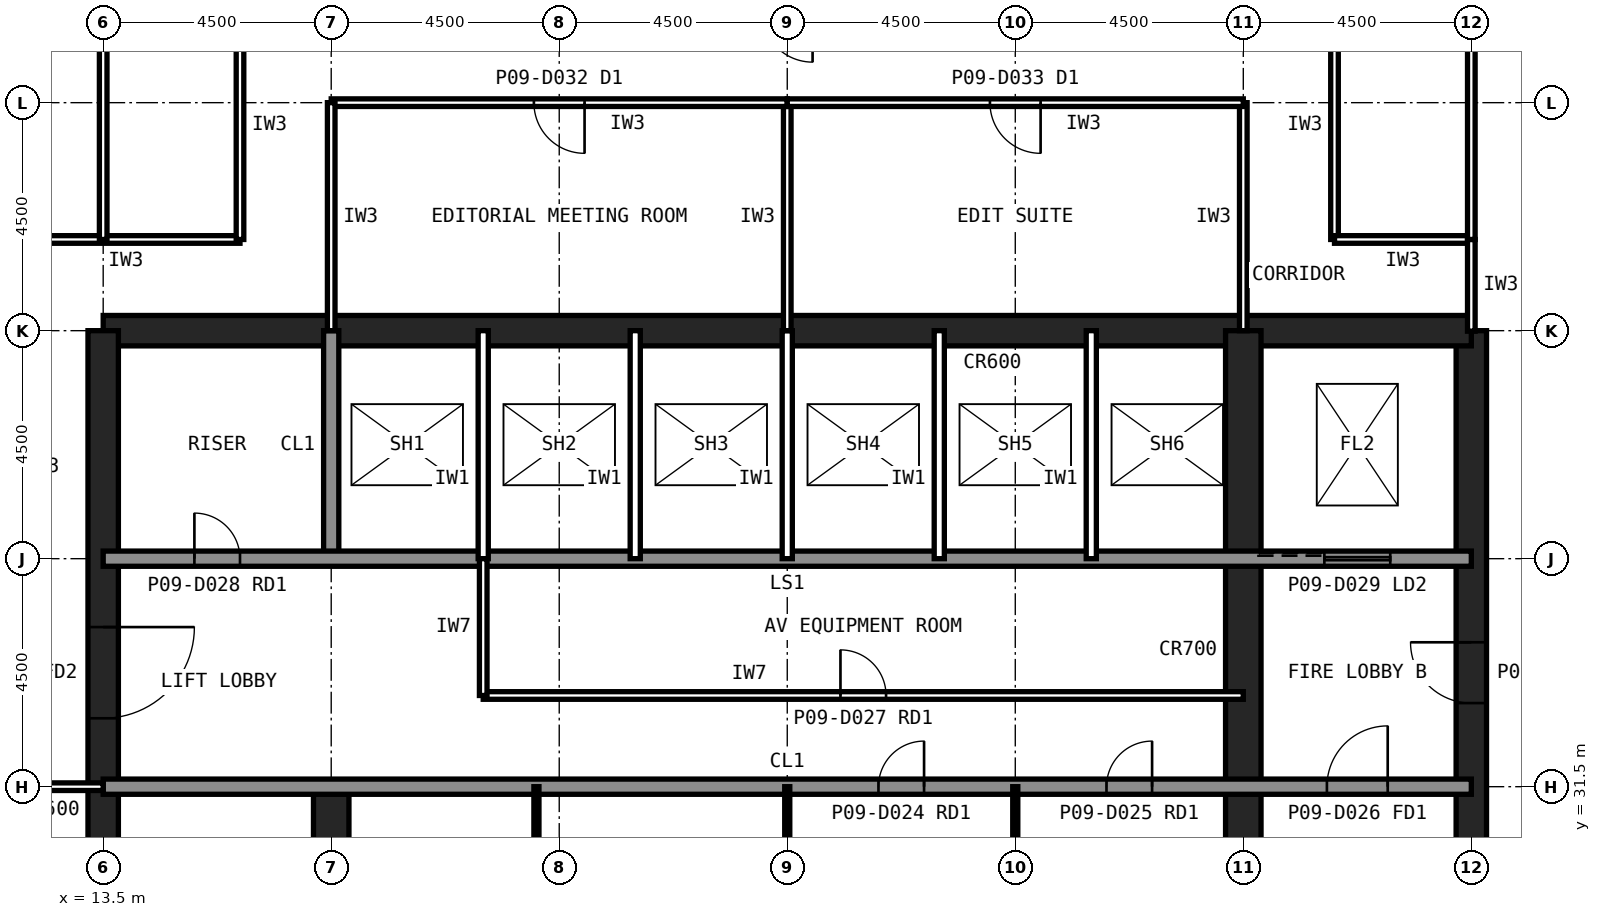
"""IFC4 building model, lengths in metres.
Left out: names, types, materials, properties, quantities, classifications, styles, units other than length and angle.
Written with IfcOpenShell. Run it as: python <this file> out.ifc"""

import sys

from ifc_helpers import new_model, si_unit, direction, frame, frame_2d, origin, place, context, subcontext, project, spatial, rectangle, extrude, element, fill, save


model = new_model("IFC4")
c1 = context("Model", 3, precision=1e-05, world=origin(), true_north=direction((0.0, 1.0)))
c2 = subcontext(c1, "Body", "Model", "MODEL_VIEW")
j1 = project(units=[si_unit("LENGTHUNIT", "METRE"), si_unit("PLANEANGLEUNIT", "RADIAN")], contexts=[c1])
p1 = place(None, origin())
s1 = spatial("IfcSite", under=j1, at=p1, CompositionType="ELEMENT")
p2 = place(p1, origin())
s2 = spatial("IfcBuilding", under=s1, at=p2, CompositionType="ELEMENT")
p3 = place(p2, frame((0.0, 0.0, 41.6)))
s3 = spatial("IfcBuildingStorey", under=s2, at=p3, CompositionType="ELEMENT", Elevation=41.6)
p4 = place(p3, frame((40.5, 13.5, 0.0), z_axis=(0.0, 0.0, 1.0), x_axis=(0.0, 1.0, 0.0)))
e1 = element("IfcWall", 1, at=p4, inside=s3, PredefinedType="SHEAR", context=c2, shape_type="SweptSolid", body=[
    extrude(rectangle(XDim=27.0, YDim=0.6, at=frame_2d((13.5, 0.0))), origin(), (0.0, 0.0, 1.0), 4.2),
])
p5 = place(p4, frame((5.85, 0.0, 0.0)))
e2 = element("IfcOpeningElement", 2, at=p5, cuts=e1, PredefinedType="OPENING", context=c2, shape_type="SweptSolid", body=[
    extrude(rectangle(XDim=1.8, YDim=2.1, at=frame_2d((0.9, 1.05))), frame((0.0, 0.31, 0.0), z_axis=(0.0, -1.0, 0.0), x_axis=(1.0, 0.0, 0.0)), (0.0, 0.0, 1.0), 0.62),
])
p6 = place(p4, frame((19.65, 0.0, 0.0)))
e3 = element("IfcOpeningElement", 3, at=p6, cuts=e1, PredefinedType="OPENING", context=c2, shape_type="SweptSolid", body=[
    extrude(rectangle(XDim=1.2, YDim=2.1, at=frame_2d((0.6, 1.05))), frame((0.0, 0.31, 0.0), z_axis=(0.0, -1.0, 0.0), x_axis=(1.0, 0.0, 0.0)), (0.0, 0.0, 1.0), 0.62),
])
p7 = place(p3, frame((40.5, 40.5, 0.0), z_axis=(0.0, 0.0, 1.0), x_axis=(-1.0, 0.0, 0.0)))
e4 = element("IfcWall", 4, at=p7, inside=s3, PredefinedType="SHEAR", context=c2, shape_type="SweptSolid", body=[
    extrude(rectangle(XDim=27.0, YDim=0.6, at=frame_2d((13.5, 0.0))), origin(), (0.0, 0.0, 1.0), 4.2),
])
p8 = place(p3, frame((13.5, 40.5, 0.0), z_axis=(0.0, 0.0, 1.0), x_axis=(0.0, -1.0, 0.0)))
e5 = element("IfcWall", 5, at=p8, inside=s3, PredefinedType="SHEAR", context=c2, shape_type="SweptSolid", body=[
    extrude(rectangle(XDim=27.0, YDim=0.6, at=frame_2d((13.5, 0.0))), origin(), (0.0, 0.0, 1.0), 4.2),
])
p9 = place(p8, frame((19.65, 0.0, 0.0)))
e6 = element("IfcOpeningElement", 6, at=p9, cuts=e5, PredefinedType="OPENING", context=c2, shape_type="SweptSolid", body=[
    extrude(rectangle(XDim=1.2, YDim=2.1, at=frame_2d((0.6, 1.05))), frame((0.0, 0.31, 0.0), z_axis=(0.0, -1.0, 0.0), x_axis=(1.0, 0.0, 0.0)), (0.0, 0.0, 1.0), 0.62),
])
p10 = place(p8, frame((5.85, 0.0, 0.0)))
e7 = element("IfcOpeningElement", 7, at=p10, cuts=e5, PredefinedType="OPENING", context=c2, shape_type="SweptSolid", body=[
    extrude(rectangle(XDim=1.8, YDim=2.1, at=frame_2d((0.9, 1.05))), frame((0.0, 0.31, 0.0), z_axis=(0.0, -1.0, 0.0), x_axis=(1.0, 0.0, 0.0)), (0.0, 0.0, 1.0), 0.62),
])
p11 = place(p3, frame((18.0, 13.5, 0.0), z_axis=(0.0, 0.0, 1.0), x_axis=(0.0, 1.0, 0.0)))
e8 = element("IfcWall", 8, at=p11, inside=s3, PredefinedType="SHEAR", context=c2, shape_type="SweptSolid", body=[
    extrude(rectangle(XDim=18.0, YDim=0.7, at=frame_2d((9.0, 0.0))), origin(), (0.0, 0.0, 1.0), 4.2),
])
p12 = place(p3, frame((18.0, 36.0, 0.0), z_axis=(0.0, 0.0, 1.0), x_axis=(0.0, 1.0, 0.0)))
e9 = element("IfcWall", 9, at=p12, inside=s3, PredefinedType="SOLIDWALL", context=c2, shape_type="SweptSolid", body=[
    extrude(rectangle(XDim=4.5, YDim=0.3, at=frame_2d((2.25, 0.0))), origin(), (0.0, 0.0, 1.0), 4.04),
])
p13 = place(p3, frame((36.0, 22.5, 0.0), z_axis=(0.0, 0.0, 1.0), x_axis=(0.0, 1.0, 0.0)))
e10 = element("IfcWall", 10, at=p13, inside=s3, PredefinedType="SHEAR", context=c2, shape_type="SweptSolid", body=[
    extrude(rectangle(XDim=18.0, YDim=0.7, at=frame_2d((9.0, 0.0))), origin(), (0.0, 0.0, 1.0), 4.2),
])
p14 = place(p3, frame((13.5, 36.0, 0.0), z_axis=(0.0, 0.0, 1.0), x_axis=(1.0, 0.0, 0.0)))
e11 = element("IfcWall", 11, at=p14, inside=s3, PredefinedType="SOLIDWALL", context=c2, shape_type="SweptSolid", body=[
    extrude(rectangle(XDim=27.0, YDim=0.3, at=frame_2d((13.5, 0.0))), origin(), (0.0, 0.0, 1.0), 4.04),
])
p15 = place(p14, frame((1.8, 0.0, 0.0)))
e12 = element("IfcOpeningElement", 12, at=p15, cuts=e11, PredefinedType="OPENING", context=c2, shape_type="SweptSolid", body=[
    extrude(rectangle(XDim=0.9, YDim=2.1, at=frame_2d((0.45, 1.05))), frame((0.0, 0.16, 0.0), z_axis=(0.0, -1.0, 0.0), x_axis=(1.0, 0.0, 0.0)), (0.0, 0.0, 1.0), 0.32),
])
p16 = place(p14, frame((24.1, 0.0, 0.0)))
e13 = element("IfcOpeningElement", 13, at=p16, cuts=e11, PredefinedType="OPENING", context=c2, shape_type="SweptSolid", body=[
    extrude(rectangle(XDim=1.3, YDim=2.2, at=frame_2d((0.65, 1.1))), frame((0.0, 0.16, 0.0), z_axis=(0.0, -1.0, 0.0), x_axis=(1.0, 0.0, 0.0)), (0.0, 0.0, 1.0), 0.32),
])
p17 = place(p3, frame((13.5, 31.5, 0.0), z_axis=(0.0, 0.0, 1.0), x_axis=(1.0, 0.0, 0.0)))
e14 = element("IfcWall", 14, at=p17, inside=s3, PredefinedType="SOLIDWALL", context=c2, shape_type="SweptSolid", body=[
    extrude(rectangle(XDim=27.0, YDim=0.3, at=frame_2d((13.5, 0.0))), origin(), (0.0, 0.0, 1.0), 4.04),
])
p18 = place(p17, frame((24.15, 0.0, 0.0)))
e15 = element("IfcOpeningElement", 15, at=p18, cuts=e14, PredefinedType="OPENING", context=c2, shape_type="SweptSolid", body=[
    extrude(rectangle(XDim=1.2, YDim=2.1, at=frame_2d((0.6, 1.05))), frame((0.0, 0.16, 0.0), z_axis=(0.0, -1.0, 0.0), x_axis=(1.0, 0.0, 0.0)), (0.0, 0.0, 1.0), 0.32),
])
p19 = place(p17, frame((15.3, 0.0, 0.0)))
e16 = element("IfcOpeningElement", 16, at=p19, cuts=e14, PredefinedType="OPENING", context=c2, shape_type="SweptSolid", body=[
    extrude(rectangle(XDim=0.9, YDim=2.1, at=frame_2d((0.45, 1.05))), frame((0.0, 0.16, 0.0), z_axis=(0.0, -1.0, 0.0), x_axis=(1.0, 0.0, 0.0)), (0.0, 0.0, 1.0), 0.32),
])
p20 = place(p17, frame((19.8, 0.0, 0.0)))
e17 = element("IfcOpeningElement", 17, at=p20, cuts=e14, PredefinedType="OPENING", context=c2, shape_type="SweptSolid", body=[
    extrude(rectangle(XDim=0.9, YDim=2.1, at=frame_2d((0.45, 1.05))), frame((0.0, 0.16, 0.0), z_axis=(0.0, -1.0, 0.0), x_axis=(1.0, 0.0, 0.0)), (0.0, 0.0, 1.0), 0.32),
])
for number, where, z_axis, x_axis in (
    (18, (21.0, 36.0, 0.0), (0.0, 0.0, 1.0), (0.0, 1.0, 0.0)),
    (19, (24.0, 36.0, 0.0), (0.0, 0.0, 1.0), (0.0, 1.0, 0.0)),
    (20, (27.0, 36.0, 0.0), (0.0, 0.0, 1.0), (0.0, 1.0, 0.0)),
    (21, (30.0, 36.0, 0.0), (0.0, 0.0, 1.0), (0.0, 1.0, 0.0)),
    (22, (33.0, 36.0, 0.0), (0.0, 0.0, 1.0), (0.0, 1.0, 0.0)),
):
    element("IfcWall", number, at=place(p3, frame(where, z_axis=z_axis, x_axis=x_axis)), inside=s3, PredefinedType="PARTITIONING", context=c2, shape_type="SweptSolid", body=[
        extrude(rectangle(XDim=4.5, YDim=0.2, at=frame_2d((2.25, 0.0))), origin(), (0.0, 0.0, 1.0), 4.04),
    ])
for number, where, z_axis, x_axis in (
    (23, (22.05, 22.5, 0.0), (0.0, 0.0, 1.0), (0.0, 1.0, 0.0)),
    (24, (27.0, 22.5, 0.0), (0.0, 0.0, 1.0), (0.0, 1.0, 0.0)),
    (25, (31.5, 22.5, 0.0), (0.0, 0.0, 1.0), (0.0, 1.0, 0.0)),
):
    element("IfcWall", number, at=place(p3, frame(where, z_axis=z_axis, x_axis=x_axis)), inside=s3, PredefinedType="PLUMBINGWALL", context=c2, shape_type="SweptSolid", body=[
        extrude(rectangle(XDim=9.0, YDim=0.1, at=frame_2d((4.5, 0.0))), origin(), (0.0, 0.0, 1.0), 4.04),
    ])
p21 = place(p3, frame((21.0, 33.3, 0.0), z_axis=(0.0, 0.0, 1.0), x_axis=(1.0, 0.0, 0.0)))
e26 = element("IfcWall", 26, at=p21, inside=s3, PredefinedType="PARTITIONING", context=c2, shape_type="SweptSolid", body=[
    extrude(rectangle(XDim=15.0, YDim=0.15, at=frame_2d((7.5, 0.0))), origin(), (0.0, 0.0, 1.0), 4.04),
])
p22 = place(p21, frame((7.05, 0.0, 0.0)))
e27 = element("IfcOpeningElement", 27, at=p22, cuts=e26, PredefinedType="OPENING", context=c2, shape_type="SweptSolid", body=[
    extrude(rectangle(XDim=0.9, YDim=2.1, at=frame_2d((0.45, 1.05))), frame((0.0, 0.085, 0.0), z_axis=(0.0, -1.0, 0.0), x_axis=(1.0, 0.0, 0.0)), (0.0, 0.0, 1.0), 0.17),
])
p23 = place(p3, frame((21.0, 33.3, 0.0), z_axis=(0.0, 0.0, 1.0), x_axis=(0.0, 1.0, 0.0)))
e28 = element("IfcWall", 28, at=p23, inside=s3, PredefinedType="PARTITIONING", context=c2, shape_type="SweptSolid", body=[
    extrude(rectangle(XDim=2.7, YDim=0.15, at=frame_2d((1.35, 0.0))), origin(), (0.0, 0.0, 1.0), 4.04),
])
for number, where, z_axis, x_axis in (
    (29, (16.2, 42.3, 0.0), (0.0, 0.0, 1.0), (-1.0, 0.0, 0.0)),
    (30, (16.2, 46.8, 0.0), (0.0, 0.0, 1.0), (0.0, -1.0, 0.0)),
    (31, (37.8, 42.3, 0.0), (0.0, 0.0, 1.0), (0.0, 1.0, 0.0)),
):
    element("IfcWall", number, at=place(p3, frame(where, z_axis=z_axis, x_axis=x_axis)), inside=s3, PredefinedType="PARTITIONING", context=c2, shape_type="SweptSolid", body=[
        extrude(rectangle(XDim=4.5, YDim=0.15, at=frame_2d((2.25, 0.0))), origin(), (0.0, 0.0, 1.0), 4.04),
    ])
p24 = place(p3, frame((40.5, 42.3, 0.0), z_axis=(0.0, 0.0, 1.0), x_axis=(-1.0, 0.0, 0.0)))
e32 = element("IfcWall", 32, at=p24, inside=s3, PredefinedType="PARTITIONING", context=c2, shape_type="SweptSolid", body=[
    extrude(rectangle(XDim=2.7, YDim=0.15, at=frame_2d((1.35, 0.0))), origin(), (0.0, 0.0, 1.0), 4.04),
])
p25 = place(p3, frame((40.5, 40.49, 0.0), z_axis=(0.0, 0.0, 1.0), x_axis=(0.0, 1.0, 0.0)))
e33 = element("IfcWall", 33, at=p25, inside=s3, PredefinedType="PARTITIONING", context=c2, shape_type="SweptSolid", body=[
    extrude(rectangle(XDim=1.81, YDim=0.15, at=frame_2d((0.905, 0.0))), origin(), (0.0, 0.0, 1.0), 3.189),
])
p26 = place(p3, frame((27.0, 40.5, 0.0), z_axis=(0.0, 0.0, 1.0), x_axis=(0.0, 1.0, 0.0)))
e34 = element("IfcWall", 34, at=p26, inside=s3, PredefinedType="PARTITIONING", context=c2, shape_type="SweptSolid", body=[
    extrude(rectangle(XDim=4.5, YDim=0.15, at=frame_2d((2.25, 0.0))), origin(), (0.0, 0.0, 1.0), 3.189),
])
p27 = place(p3, frame((27.0, 45.0, 0.0), z_axis=(0.0, 0.0, 1.0), x_axis=(-1.0, 0.0, 0.0)))
e35 = element("IfcWall", 35, at=p27, inside=s3, PredefinedType="PARTITIONING", context=c2, shape_type="SweptSolid", body=[
    extrude(rectangle(XDim=9.0, YDim=0.15, at=frame_2d((4.5, 0.0))), origin(), (0.0, 0.0, 1.0), 4.04),
])
p28 = place(p27, frame((4.0, 0.0, 0.0)))
e36 = element("IfcOpeningElement", 36, at=p28, cuts=e35, PredefinedType="OPENING", context=c2, shape_type="SweptSolid", body=[
    extrude(rectangle(XDim=1.0, YDim=2.1, at=frame_2d((0.5, 1.05))), frame((0.0, 0.085, 0.0), z_axis=(0.0, -1.0, 0.0), x_axis=(1.0, 0.0, 0.0)), (0.0, 0.0, 1.0), 0.17),
])
for number, where, z_axis, x_axis in (
    (37, (18.0, 45.0, 0.0), (0.0, 0.0, 1.0), (0.0, -1.0, 0.0)),
    (38, (36.0, 40.5, 0.0), (0.0, 0.0, 1.0), (0.0, 1.0, 0.0)),
):
    element("IfcWall", number, at=place(p3, frame(where, z_axis=z_axis, x_axis=x_axis)), inside=s3, PredefinedType="PARTITIONING", context=c2, shape_type="SweptSolid", body=[
        extrude(rectangle(XDim=4.5, YDim=0.15, at=frame_2d((2.25, 0.0))), origin(), (0.0, 0.0, 1.0), 3.189),
    ])
p29 = place(p3, frame((36.0, 45.0, 0.0), z_axis=(0.0, 0.0, 1.0), x_axis=(-1.0, 0.0, 0.0)))
e39 = element("IfcWall", 39, at=p29, inside=s3, PredefinedType="PARTITIONING", context=c2, shape_type="SweptSolid", body=[
    extrude(rectangle(XDim=9.0, YDim=0.15, at=frame_2d((4.5, 0.0))), origin(), (0.0, 0.0, 1.0), 4.04),
])
p30 = place(p29, frame((4.0, 0.0, 0.0)))
e40 = element("IfcOpeningElement", 40, at=p30, cuts=e39, PredefinedType="OPENING", context=c2, shape_type="SweptSolid", body=[
    extrude(rectangle(XDim=1.0, YDim=2.1, at=frame_2d((0.5, 1.05))), frame((0.0, 0.085, 0.0), z_axis=(0.0, -1.0, 0.0), x_axis=(1.0, 0.0, 0.0)), (0.0, 0.0, 1.0), 0.17),
])
p31 = place(p3, frame((13.5, 31.5, 0.0), z_axis=(0.0, 0.0, 1.0), x_axis=(-1.0, 0.0, 0.0)))
e41 = element("IfcWall", 41, at=p31, inside=s3, PredefinedType="PARTITIONING", context=c2, shape_type="SweptSolid", body=[
    extrude(rectangle(XDim=4.5, YDim=0.15, at=frame_2d((2.25, 0.0))), origin(), (0.0, 0.0, 1.0), 3.189),
])
p32 = place(p3, frame((40.5, 53.53, 0.0), z_axis=(0.0, 0.0, 1.0), x_axis=(0.0, -1.0, 0.0)))
e42 = element("IfcWall", 42, at=p32, inside=s3, PredefinedType="PARTITIONING", context=c2, shape_type="SweptSolid", body=[
    extrude(rectangle(XDim=11.23, YDim=0.15, at=frame_2d((5.615, 0.0))), origin(), (0.0, 0.0, 1.0), 3.189),
])
p33 = place(p32, frame((5.115, 0.0, 0.0)))
e43 = element("IfcOpeningElement", 43, at=p33, cuts=e42, PredefinedType="OPENING", context=c2, shape_type="SweptSolid", body=[
    extrude(rectangle(XDim=1.0, YDim=2.1, at=frame_2d((0.5, 1.05))), frame((0.0, 0.085, 0.0), z_axis=(0.0, -1.0, 0.0), x_axis=(1.0, 0.0, 0.0)), (0.0, 0.0, 1.0), 0.17),
])
p34 = place(p3, frame((13.5, 42.3, 0.0), z_axis=(0.0, 0.0, 1.0), x_axis=(0.0, 1.0, 0.0)))
e44 = element("IfcWall", 44, at=p34, inside=s3, PredefinedType="PARTITIONING", context=c2, shape_type="SweptSolid", body=[
    extrude(rectangle(XDim=11.23, YDim=0.15, at=frame_2d((5.615, 0.0))), origin(), (0.0, 0.0, 1.0), 3.189),
])
p35 = place(p34, frame((5.115, 0.0, 0.0)))
e45 = element("IfcOpeningElement", 45, at=p35, cuts=e44, PredefinedType="OPENING", context=c2, shape_type="SweptSolid", body=[
    extrude(rectangle(XDim=1.0, YDim=2.1, at=frame_2d((0.5, 1.05))), frame((0.0, 0.085, 0.0), z_axis=(0.0, -1.0, 0.0), x_axis=(1.0, 0.0, 0.0)), (0.0, 0.0, 1.0), 0.17),
])
p36 = place(p10, origin())
e46 = element("IfcDoor", 46, at=p36, inside=s3, OperationType="SINGLE_SWING_LEFT", PredefinedType="DOOR", context=c2, shape_type="SweptSolid", body=[
    extrude(rectangle(XDim=1.8, YDim=2.1, at=frame_2d((0.9, 1.05))), frame((0.0, 0.025, 0.0), z_axis=(0.0, -1.0, 0.0), x_axis=(1.0, 0.0, 0.0)), (0.0, 0.0, 1.0), 0.05),
])
fill(e7, e46)
p37 = place(p6, origin())
e47 = element("IfcDoor", 47, at=p37, inside=s3, OperationType="SINGLE_SWING_RIGHT", PredefinedType="DOOR", context=c2, shape_type="SweptSolid", body=[
    extrude(rectangle(XDim=1.2, YDim=2.1, at=frame_2d((0.6, 1.05))), frame((0.0, 0.025, 0.0), z_axis=(0.0, -1.0, 0.0), x_axis=(1.0, 0.0, 0.0)), (0.0, 0.0, 1.0), 0.05),
])
fill(e3, e47)
p38 = place(p18, origin())
e48 = element("IfcDoor", 48, at=p38, inside=s3, OperationType="SINGLE_SWING_RIGHT", PredefinedType="DOOR", context=c2, shape_type="SweptSolid", body=[
    extrude(rectangle(XDim=1.2, YDim=2.1, at=frame_2d((0.6, 1.05))), frame((0.0, 0.025, 0.0), z_axis=(0.0, -1.0, 0.0), x_axis=(1.0, 0.0, 0.0)), (0.0, 0.0, 1.0), 0.05),
])
fill(e15, e48)
p39 = place(p19, origin())
e49 = element("IfcDoor", 49, at=p39, inside=s3, OperationType="SINGLE_SWING_RIGHT", PredefinedType="DOOR", context=c2, shape_type="SweptSolid", body=[
    extrude(rectangle(XDim=0.9, YDim=2.1, at=frame_2d((0.45, 1.05))), frame((0.0, 0.025, 0.0), z_axis=(0.0, -1.0, 0.0), x_axis=(1.0, 0.0, 0.0)), (0.0, 0.0, 1.0), 0.05),
])
fill(e16, e49)
p40 = place(p20, origin())
e50 = element("IfcDoor", 50, at=p40, inside=s3, OperationType="SINGLE_SWING_RIGHT", PredefinedType="DOOR", context=c2, shape_type="SweptSolid", body=[
    extrude(rectangle(XDim=0.9, YDim=2.1, at=frame_2d((0.45, 1.05))), frame((0.0, 0.025, 0.0), z_axis=(0.0, -1.0, 0.0), x_axis=(1.0, 0.0, 0.0)), (0.0, 0.0, 1.0), 0.05),
])
fill(e17, e50)
p41 = place(p15, origin())
e51 = element("IfcDoor", 51, at=p41, inside=s3, OperationType="SINGLE_SWING_LEFT", PredefinedType="DOOR", context=c2, shape_type="SweptSolid", body=[
    extrude(rectangle(XDim=0.9, YDim=2.1, at=frame_2d((0.45, 1.05))), frame((0.0, 0.025, 0.0), z_axis=(0.0, -1.0, 0.0), x_axis=(1.0, 0.0, 0.0)), (0.0, 0.0, 1.0), 0.05),
])
fill(e12, e51)
p42 = place(p22, origin())
e52 = element("IfcDoor", 52, at=p42, inside=s3, OperationType="SINGLE_SWING_LEFT", PredefinedType="DOOR", context=c2, shape_type="SweptSolid", body=[
    extrude(rectangle(XDim=0.9, YDim=2.1, at=frame_2d((0.45, 1.05))), frame((0.0, 0.025, 0.0), z_axis=(0.0, -1.0, 0.0), x_axis=(1.0, 0.0, 0.0)), (0.0, 0.0, 1.0), 0.05),
])
fill(e27, e52)
p43 = place(p16, origin())
e53 = element("IfcDoor", 53, at=p43, inside=s3, OperationType="SLIDING_TO_LEFT", PredefinedType="DOOR", context=c2, shape_type="SweptSolid", body=[
    extrude(rectangle(XDim=1.3, YDim=2.2, at=frame_2d((0.65, 1.1))), frame((0.0, 0.025, 0.0), z_axis=(0.0, -1.0, 0.0), x_axis=(1.0, 0.0, 0.0)), (0.0, 0.0, 1.0), 0.05),
])
fill(e13, e53)
p44 = place(p28, origin())
e54 = element("IfcDoor", 54, at=p44, inside=s3, OperationType="SINGLE_SWING_LEFT", PredefinedType="DOOR", context=c2, shape_type="SweptSolid", body=[
    extrude(rectangle(XDim=1.0, YDim=2.1, at=frame_2d((0.5, 1.05))), frame((0.0, 0.025, 0.0), z_axis=(0.0, -1.0, 0.0), x_axis=(1.0, 0.0, 0.0)), (0.0, 0.0, 1.0), 0.05),
])
fill(e36, e54)
p45 = place(p30, origin())
e55 = element("IfcDoor", 55, at=p45, inside=s3, OperationType="SINGLE_SWING_LEFT", PredefinedType="DOOR", context=c2, shape_type="SweptSolid", body=[
    extrude(rectangle(XDim=1.0, YDim=2.1, at=frame_2d((0.5, 1.05))), frame((0.0, 0.025, 0.0), z_axis=(0.0, -1.0, 0.0), x_axis=(1.0, 0.0, 0.0)), (0.0, 0.0, 1.0), 0.05),
])
fill(e40, e55)
save(model, sys.argv[1])
